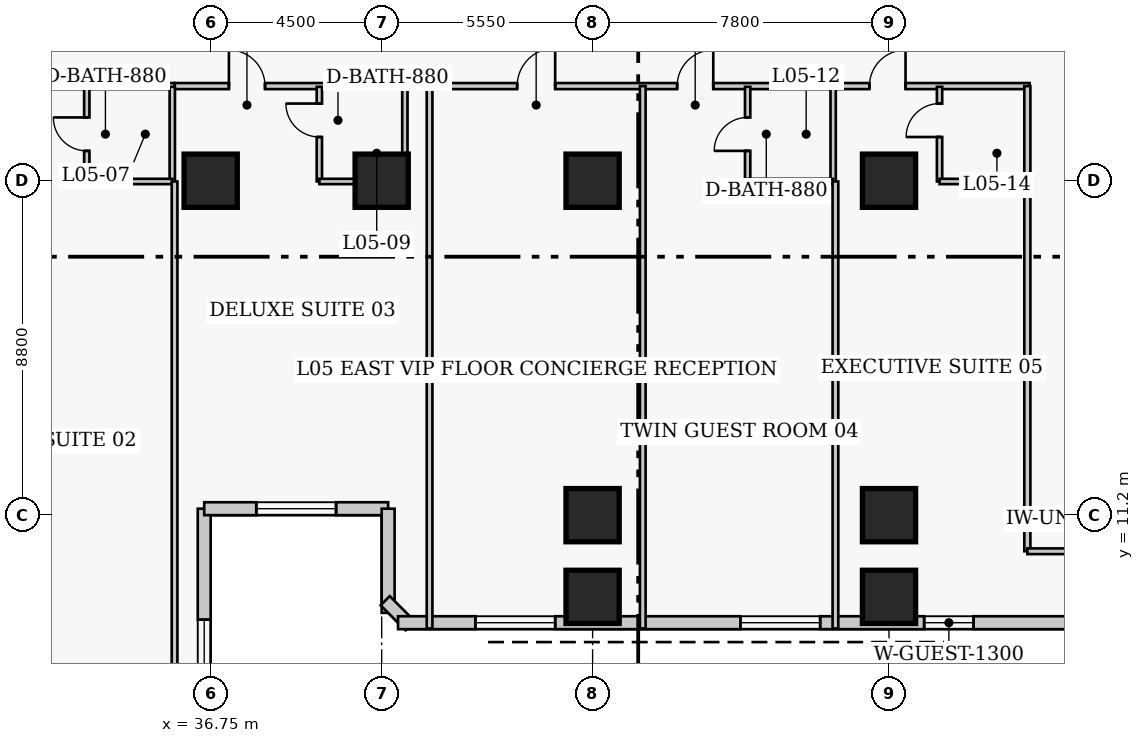
"""IFC4 building model, lengths in metres.
Left out: names, types, materials, properties, quantities, classifications, styles, units other than length and angle.
Written with IfcOpenShell. Run it as: python <this file> out.ifc"""

import sys

from ifc_helpers import new_model, si_unit, direction, frame, frame_2d, origin, origin_2d, place, context, subcontext, project, spatial, rectangle, extrude, element, fill, save


model = new_model("IFC4")
c1 = context("Model", 3, precision=1e-05, world=origin(), true_north=direction((0.0, 1.0)))
c2 = subcontext(c1, "Body", "Model", "MODEL_VIEW")
j1 = project(units=[si_unit("LENGTHUNIT", "METRE"), si_unit("PLANEANGLEUNIT", "RADIAN")], contexts=[c1])
p1 = place(None, origin())
s1 = spatial("IfcSite", under=j1, at=p1, CompositionType="ELEMENT")
p2 = place(p1, origin())
s2 = spatial("IfcBuilding", under=s1, at=p2, CompositionType="ELEMENT")
p3 = place(p2, frame((0.0, 0.0, 26.0)))
s3 = spatial("IfcBuildingStorey", under=s2, at=p3, CompositionType="ELEMENT", Elevation=26.0)
for number, where, z_axis, x_axis in (
    (1, (36.75, 20.0, 0.0), (0.0, 0.0, 1.0), (1.0, 0.0, 0.0)),
    (2, (41.25, 20.0, 0.0), (0.0, 0.0, 1.0), (1.0, 0.0, 0.0)),
    (3, (46.8, 11.2, 0.0), (0.0, 0.0, 1.0), (1.0, 0.0, 0.0)),
):
    element("IfcColumn", number, at=place(p3, frame(where, z_axis=z_axis, x_axis=x_axis)), inside=s3, PredefinedType="COLUMN", context=c2, shape_type="SweptSolid", body=[
        extrude(rectangle(XDim=1.4, YDim=1.4, at=origin_2d()), origin(), (0.0, 0.0, 1.0), 3.8),
    ])
p4 = place(p3, frame((46.8, 20.0, -0.26), z_axis=(0.0, 0.0, 1.0), x_axis=(1.0, 0.0, 0.0)))
e4 = element("IfcColumn", 4, at=p4, inside=s3, PredefinedType="COLUMN", context=c2, shape_type="SweptSolid", body=[
    extrude(rectangle(XDim=1.4, YDim=1.4, at=origin_2d()), origin(), (0.0, 0.0, 1.0), 4.06),
])
p5 = place(p3, frame((54.6, 11.2, 0.0), z_axis=(0.0, 0.0, 1.0), x_axis=(1.0, 0.0, 0.0)))
e5 = element("IfcColumn", 5, at=p5, inside=s3, PredefinedType="COLUMN", context=c2, shape_type="SweptSolid", body=[
    extrude(rectangle(XDim=1.4, YDim=1.4, at=origin_2d()), origin(), (0.0, 0.0, 1.0), 3.8),
])
p6 = place(p3, frame((54.6, 20.0, -0.26), z_axis=(0.0, 0.0, 1.0), x_axis=(1.0, 0.0, 0.0)))
e6 = element("IfcColumn", 6, at=p6, inside=s3, PredefinedType="COLUMN", context=c2, shape_type="SweptSolid", body=[
    extrude(rectangle(XDim=1.4, YDim=1.4, at=origin_2d()), origin(), (0.0, 0.0, 1.0), 4.06),
])
for number, where, z_axis, x_axis in (
    (7, (46.8, 9.05, 0.0), (0.0, 0.0, 1.0), (1.0, 0.0, 0.0)),
    (8, (54.6, 9.05, 0.0), (0.0, 0.0, 1.0), (1.0, 0.0, 0.0)),
):
    element("IfcColumn", number, at=place(p3, frame(where, z_axis=z_axis, x_axis=x_axis)), inside=s3, PredefinedType="COLUMN", context=c2, shape_type="SweptSolid", body=[
        extrude(rectangle(XDim=1.4, YDim=1.4, at=origin_2d()), origin(), (0.0, 0.0, 1.0), 3.8),
    ])
p7 = place(p3, frame((36.58, 3.43, 0.0), z_axis=(0.0, 0.0, 1.0), x_axis=(0.0, 1.0, 0.0)))
e9 = element("IfcWall", 9, at=p7, inside=s3, PredefinedType="SOLIDWALL", context=c2, shape_type="SweptSolid", body=[
    extrude(rectangle(XDim=7.94, YDim=0.34, at=frame_2d((3.97, 0.0))), origin(), (0.0, 0.0, 1.0), 3.54),
])
p8 = place(p7, frame((2.92, 0.0, 0.85)))
e10 = element("IfcOpeningElement", 10, at=p8, cuts=e9, PredefinedType="OPENING", context=c2, shape_type="SweptSolid", body=[
    extrude(rectangle(XDim=2.1, YDim=1.85, at=frame_2d((1.05, 0.925))), frame((0.0, 0.18, 0.0), z_axis=(0.0, -1.0, 0.0), x_axis=(1.0, 0.0, 0.0)), (0.0, 0.0, 1.0), 0.36),
])
p9 = place(p3, frame((36.58, 11.37, 0.0), z_axis=(0.0, 0.0, 1.0), x_axis=(1.0, 0.0, 0.0)))
e11 = element("IfcWall", 11, at=p9, inside=s3, PredefinedType="SOLIDWALL", context=c2, shape_type="SweptSolid", body=[
    extrude(rectangle(XDim=4.84, YDim=0.34, at=frame_2d((2.42, 0.0))), origin(), (0.0, 0.0, 1.0), 3.54),
])
p10 = place(p9, frame((1.37, 0.0, 0.85)))
e12 = element("IfcOpeningElement", 12, at=p10, cuts=e11, PredefinedType="OPENING", context=c2, shape_type="SweptSolid", body=[
    extrude(rectangle(XDim=2.1, YDim=1.85, at=frame_2d((1.05, 0.925))), frame((0.0, 0.18, 0.0), z_axis=(0.0, -1.0, 0.0), x_axis=(1.0, 0.0, 0.0)), (0.0, 0.0, 1.0), 0.36),
])
p11 = place(p3, frame((41.42, 11.37, 0.0), z_axis=(0.0, 0.0, 1.0), x_axis=(0.0, -1.0, 0.0)))
e13 = element("IfcWall", 13, at=p11, inside=s3, PredefinedType="SOLIDWALL", context=c2, shape_type="SweptSolid", body=[
    extrude(rectangle(XDim=2.74, YDim=0.34, at=frame_2d((1.37, 0.0))), origin(), (0.0, 0.0, 1.0), 3.54),
])
p12 = place(p3, frame((41.342, 8.948, 0.0), z_axis=(0.0, 0.0, 1.0), x_axis=(0.707238225886, -0.706975312048, 0.0)))
e14 = element("IfcWall", 14, at=p12, inside=s3, PredefinedType="SOLIDWALL", context=c2, shape_type="SweptSolid", body=[
    extrude(rectangle(XDim=0.929, YDim=0.34, at=frame_2d((0.464, 0.0))), origin(), (0.0, 0.0, 1.0), 3.54),
])
p13 = place(p3, frame((41.68, 8.37, 0.0), z_axis=(0.0, 0.0, 1.0), x_axis=(1.0, 0.0, 0.0)))
e15 = element("IfcWall", 15, at=p13, inside=s3, PredefinedType="SOLIDWALL", context=c2, shape_type="SweptSolid", body=[
    extrude(rectangle(XDim=29.89, YDim=0.34, at=frame_2d((14.945, 0.0))), origin(), (0.0, 0.0, 1.0), 3.54),
])
p14 = place(p13, frame((2.036, 0.0, 0.85)))
e16 = element("IfcOpeningElement", 16, at=p14, cuts=e15, PredefinedType="OPENING", context=c2, shape_type="SweptSolid", body=[
    extrude(rectangle(XDim=2.1, YDim=1.85, at=frame_2d((1.05, 0.925))), frame((0.0, 0.18, 0.0), z_axis=(0.0, -1.0, 0.0), x_axis=(1.0, 0.0, 0.0)), (0.0, 0.0, 1.0), 0.36),
])
p15 = place(p13, frame((9.009, 0.0, 0.85)))
e17 = element("IfcOpeningElement", 17, at=p15, cuts=e15, PredefinedType="OPENING", context=c2, shape_type="SweptSolid", body=[
    extrude(rectangle(XDim=2.1, YDim=1.85, at=frame_2d((1.05, 0.925))), frame((0.0, 0.18, 0.0), z_axis=(0.0, -1.0, 0.0), x_axis=(1.0, 0.0, 0.0)), (0.0, 0.0, 1.0), 0.36),
])
p16 = place(p13, frame((26.254, 0.0, 0.85)))
e18 = element("IfcOpeningElement", 18, at=p16, cuts=e15, PredefinedType="OPENING", context=c2, shape_type="SweptSolid", body=[
    extrude(rectangle(XDim=2.1, YDim=1.85, at=frame_2d((1.05, 0.925))), frame((0.0, 0.18, 0.0), z_axis=(0.0, -1.0, 0.0), x_axis=(1.0, 0.0, 0.0)), (0.0, 0.0, 1.0), 0.36),
])
p17 = place(p13, frame((13.845, 0.0, 0.85)))
e19 = element("IfcOpeningElement", 19, at=p17, cuts=e15, PredefinedType="OPENING", context=c2, shape_type="SweptSolid", body=[
    extrude(rectangle(XDim=1.3, YDim=1.7, at=frame_2d((0.65, 0.85))), frame((0.0, 0.18, 0.0), z_axis=(0.0, -1.0, 0.0), x_axis=(1.0, 0.0, 0.0)), (0.0, 0.0, 1.0), 0.36),
])
p18 = place(p3, frame((18.8, 22.49, 0.0), z_axis=(0.0, 0.0, 1.0), x_axis=(1.0, 0.0, 0.0)))
e20 = element("IfcWall", 20, at=p18, inside=s3, PredefinedType="PARTITIONING", context=c2, shape_type="SweptSolid", body=[
    extrude(rectangle(XDim=17.0, YDim=0.16, at=frame_2d((8.5, 0.0))), origin(), (0.0, 0.0, 1.0), 3.54),
])
p19 = place(p18, frame((2.085, 0.0, 0.0)))
e21 = element("IfcOpeningElement", 21, at=p19, cuts=e20, PredefinedType="OPENING", context=c2, shape_type="SweptSolid", body=[
    extrude(rectangle(XDim=1.0, YDim=2.15, at=frame_2d((0.5, 1.075))), frame((0.0, 0.09, 0.0), z_axis=(0.0, -1.0, 0.0), x_axis=(1.0, 0.0, 0.0)), (0.0, 0.0, 1.0), 0.18),
])
p20 = place(p18, frame((6.052, 0.0, 0.0)))
e22 = element("IfcOpeningElement", 22, at=p20, cuts=e20, PredefinedType="OPENING", context=c2, shape_type="SweptSolid", body=[
    extrude(rectangle(XDim=0.95, YDim=2.1, at=frame_2d((0.475, 1.05))), frame((0.0, 0.09, 0.0), z_axis=(0.0, -1.0, 0.0), x_axis=(1.0, 0.0, 0.0)), (0.0, 0.0, 1.0), 0.18),
])
p21 = place(p18, frame((11.997, 0.0, 0.0)))
e23 = element("IfcOpeningElement", 23, at=p21, cuts=e20, PredefinedType="OPENING", context=c2, shape_type="SweptSolid", body=[
    extrude(rectangle(XDim=0.95, YDim=2.1, at=frame_2d((0.475, 1.05))), frame((0.0, 0.09, 0.0), z_axis=(0.0, -1.0, 0.0), x_axis=(1.0, 0.0, 0.0)), (0.0, 0.0, 1.0), 0.18),
])
p22 = place(p3, frame((35.8, 22.49, 0.0), z_axis=(0.0, 0.0, 1.0), x_axis=(1.0, 0.0, 0.0)))
e24 = element("IfcWall", 24, at=p22, inside=s3, PredefinedType="PARTITIONING", context=c2, shape_type="SweptSolid", body=[
    extrude(rectangle(XDim=22.5, YDim=0.16, at=frame_2d((11.25, 0.0))), origin(), (0.0, 0.0, 1.0), 3.54),
])
p23 = place(p22, frame((1.43, 0.0, 0.0)))
e25 = element("IfcOpeningElement", 25, at=p23, cuts=e24, PredefinedType="OPENING", context=c2, shape_type="SweptSolid", body=[
    extrude(rectangle(XDim=0.95, YDim=2.1, at=frame_2d((0.475, 1.05))), frame((0.0, 0.09, 0.0), z_axis=(0.0, -1.0, 0.0), x_axis=(1.0, 0.0, 0.0)), (0.0, 0.0, 1.0), 0.18),
])
p24 = place(p22, frame((9.015, 0.0, 0.0)))
e26 = element("IfcOpeningElement", 26, at=p24, cuts=e24, PredefinedType="OPENING", context=c2, shape_type="SweptSolid", body=[
    extrude(rectangle(XDim=1.0, YDim=2.15, at=frame_2d((0.5, 1.075))), frame((0.0, 0.09, 0.0), z_axis=(0.0, -1.0, 0.0), x_axis=(1.0, 0.0, 0.0)), (0.0, 0.0, 1.0), 0.18),
])
p25 = place(p22, frame((13.225, 0.0, 0.0)))
e27 = element("IfcOpeningElement", 27, at=p25, cuts=e24, PredefinedType="OPENING", context=c2, shape_type="SweptSolid", body=[
    extrude(rectangle(XDim=0.95, YDim=2.1, at=frame_2d((0.475, 1.05))), frame((0.0, 0.09, 0.0), z_axis=(0.0, -1.0, 0.0), x_axis=(1.0, 0.0, 0.0)), (0.0, 0.0, 1.0), 0.18),
])
p26 = place(p22, frame((18.285, 0.0, 0.0)))
e28 = element("IfcOpeningElement", 28, at=p26, cuts=e24, PredefinedType="OPENING", context=c2, shape_type="SweptSolid", body=[
    extrude(rectangle(XDim=0.95, YDim=2.1, at=frame_2d((0.475, 1.05))), frame((0.0, 0.09, 0.0), z_axis=(0.0, -1.0, 0.0), x_axis=(1.0, 0.0, 0.0)), (0.0, 0.0, 1.0), 0.18),
])
p27 = place(p3, frame((58.24, 10.25, 0.0), z_axis=(0.0, 0.0, 1.0), x_axis=(0.0, 1.0, 0.0)))
e29 = element("IfcWall", 29, at=p27, inside=s3, PredefinedType="PARTITIONING", context=c2, shape_type="SweptSolid", body=[
    extrude(rectangle(XDim=12.24, YDim=0.16, at=frame_2d((6.12, 0.0))), origin(), (0.0, 0.0, 1.0), 3.54),
])
p28 = place(p3, frame((58.24, 10.25, 0.0), z_axis=(0.0, 0.0, 1.0), x_axis=(1.0, 0.0, 0.0)))
e30 = element("IfcWall", 30, at=p28, inside=s3, PredefinedType="PARTITIONING", context=c2, shape_type="SweptSolid", body=[
    extrude(rectangle(XDim=2.22, YDim=0.15, at=frame_2d((1.11, 0.0))), origin(), (0.0, 0.0, 1.0), 3.54),
])
p29 = place(p3, frame((33.49, 19.98, 0.0), z_axis=(0.0, 0.0, 1.0), x_axis=(0.0, 1.0, 0.0)))
e31 = element("IfcWall", 31, at=p29, inside=s3, PredefinedType="PLUMBINGWALL", context=c2, shape_type="SweptSolid", body=[
    extrude(rectangle(XDim=2.49, YDim=0.14, at=frame_2d((1.245, 0.0))), origin(), (0.0, 0.0, 1.0), 3.54),
])
p30 = place(p29, frame((0.805, 0.0, 0.0)))
e32 = element("IfcOpeningElement", 32, at=p30, cuts=e31, PredefinedType="OPENING", context=c2, shape_type="SweptSolid", body=[
    extrude(rectangle(XDim=0.88, YDim=2.05, at=frame_2d((0.44, 1.025))), frame((0.0, 0.08, 0.0), z_axis=(0.0, -1.0, 0.0), x_axis=(1.0, 0.0, 0.0)), (0.0, 0.0, 1.0), 0.16),
])
p31 = place(p3, frame((35.74, 19.98, 0.0), z_axis=(0.0, 0.0, 1.0), x_axis=(0.0, 1.0, 0.0)))
e33 = element("IfcWall", 33, at=p31, inside=s3, PredefinedType="PLUMBINGWALL", context=c2, shape_type="SweptSolid", body=[
    extrude(rectangle(XDim=2.49, YDim=0.14, at=frame_2d((1.245, 0.0))), origin(), (0.0, 0.0, 1.0), 3.54),
])
p32 = place(p3, frame((33.49, 19.98, 0.0), z_axis=(0.0, 0.0, 1.0), x_axis=(1.0, 0.0, 0.0)))
e34 = element("IfcWall", 34, at=p32, inside=s3, PredefinedType="PLUMBINGWALL", context=c2, shape_type="SweptSolid", body=[
    extrude(rectangle(XDim=2.25, YDim=0.14, at=frame_2d((1.125, 0.0))), origin(), (0.0, 0.0, 1.0), 2.593),
])
p33 = place(p3, frame((35.8, 3.02, 0.0), z_axis=(0.0, 0.0, 1.0), x_axis=(0.0, 1.0, 0.0)))
e35 = element("IfcWall", 35, at=p33, inside=s3, PredefinedType="PARTITIONING", context=c2, shape_type="SweptSolid", body=[
    extrude(rectangle(XDim=16.96, YDim=0.15, at=frame_2d((8.48, 0.0))), origin(), (0.0, 0.0, 1.0), 3.54),
])
p34 = place(p3, frame((39.61, 19.98, 0.0), z_axis=(0.0, 0.0, 1.0), x_axis=(0.0, 1.0, 0.0)))
e36 = element("IfcWall", 36, at=p34, inside=s3, PredefinedType="PLUMBINGWALL", context=c2, shape_type="SweptSolid", body=[
    extrude(rectangle(XDim=2.49, YDim=0.14, at=frame_2d((1.245, 0.0))), origin(), (0.0, 0.0, 1.0), 3.54),
])
p35 = place(p34, frame((1.17, 0.0, 0.0)))
e37 = element("IfcOpeningElement", 37, at=p35, cuts=e36, PredefinedType="OPENING", context=c2, shape_type="SweptSolid", body=[
    extrude(rectangle(XDim=0.88, YDim=2.05, at=frame_2d((0.44, 1.025))), frame((0.0, 0.08, 0.0), z_axis=(0.0, -1.0, 0.0), x_axis=(1.0, 0.0, 0.0)), (0.0, 0.0, 1.0), 0.16),
])
p36 = place(p3, frame((41.86, 19.98, 0.0), z_axis=(0.0, 0.0, 1.0), x_axis=(0.0, 1.0, 0.0)))
e38 = element("IfcWall", 38, at=p36, inside=s3, PredefinedType="PLUMBINGWALL", context=c2, shape_type="SweptSolid", body=[
    extrude(rectangle(XDim=2.49, YDim=0.14, at=frame_2d((1.245, 0.0))), origin(), (0.0, 0.0, 1.0), 3.54),
])
p37 = place(p3, frame((39.61, 19.98, 0.0), z_axis=(0.0, 0.0, 1.0), x_axis=(1.0, 0.0, 0.0)))
e39 = element("IfcWall", 39, at=p37, inside=s3, PredefinedType="PLUMBINGWALL", context=c2, shape_type="SweptSolid", body=[
    extrude(rectangle(XDim=2.25, YDim=0.14, at=frame_2d((1.125, 0.0))), origin(), (0.0, 0.0, 1.0), 2.593),
])
for number, where, z_axis, x_axis in (
    (40, (42.51, 8.22, 0.0), (0.0, 0.0, 1.0), (0.0, 1.0, 0.0)),
    (41, (48.12, 8.22, 0.0), (0.0, 0.0, 1.0), (0.0, 1.0, 0.0)),
):
    element("IfcWall", number, at=place(p3, frame(where, z_axis=z_axis, x_axis=x_axis)), inside=s3, PredefinedType="PARTITIONING", context=c2, shape_type="SweptSolid", body=[
        extrude(rectangle(XDim=14.27, YDim=0.15, at=frame_2d((7.135, 0.0))), origin(), (0.0, 0.0, 1.0), 3.54),
    ])
p38 = place(p3, frame((50.88, 19.98, 0.0), z_axis=(0.0, 0.0, 1.0), x_axis=(0.0, 1.0, 0.0)))
e42 = element("IfcWall", 42, at=p38, inside=s3, PredefinedType="PLUMBINGWALL", context=c2, shape_type="SweptSolid", body=[
    extrude(rectangle(XDim=2.49, YDim=0.14, at=frame_2d((1.245, 0.0))), origin(), (0.0, 0.0, 1.0), 3.54),
])
p39 = place(p38, frame((0.805, 0.0, 0.0)))
e43 = element("IfcOpeningElement", 43, at=p39, cuts=e42, PredefinedType="OPENING", context=c2, shape_type="SweptSolid", body=[
    extrude(rectangle(XDim=0.88, YDim=2.05, at=frame_2d((0.44, 1.025))), frame((0.0, 0.08, 0.0), z_axis=(0.0, -1.0, 0.0), x_axis=(1.0, 0.0, 0.0)), (0.0, 0.0, 1.0), 0.16),
])
p40 = place(p3, frame((53.13, 19.98, 0.0), z_axis=(0.0, 0.0, 1.0), x_axis=(0.0, 1.0, 0.0)))
e44 = element("IfcWall", 44, at=p40, inside=s3, PredefinedType="PLUMBINGWALL", context=c2, shape_type="SweptSolid", body=[
    extrude(rectangle(XDim=2.49, YDim=0.14, at=frame_2d((1.245, 0.0))), origin(), (0.0, 0.0, 1.0), 3.54),
])
p41 = place(p3, frame((50.88, 19.98, 0.0), z_axis=(0.0, 0.0, 1.0), x_axis=(1.0, 0.0, 0.0)))
e45 = element("IfcWall", 45, at=p41, inside=s3, PredefinedType="PLUMBINGWALL", context=c2, shape_type="SweptSolid", body=[
    extrude(rectangle(XDim=2.25, YDim=0.14, at=frame_2d((1.125, 0.0))), origin(), (0.0, 0.0, 1.0), 2.593),
])
p42 = place(p3, frame((53.19, 8.22, 0.0), z_axis=(0.0, 0.0, 1.0), x_axis=(0.0, 1.0, 0.0)))
e46 = element("IfcWall", 46, at=p42, inside=s3, PredefinedType="PARTITIONING", context=c2, shape_type="SweptSolid", body=[
    extrude(rectangle(XDim=11.76, YDim=0.15, at=frame_2d((5.88, 0.0))), origin(), (0.0, 0.0, 1.0), 3.54),
])
p43 = place(p3, frame((55.93, 19.98, 0.0), z_axis=(0.0, 0.0, 1.0), x_axis=(0.0, 1.0, 0.0)))
e47 = element("IfcWall", 47, at=p43, inside=s3, PredefinedType="PLUMBINGWALL", context=c2, shape_type="SweptSolid", body=[
    extrude(rectangle(XDim=2.49, YDim=0.14, at=frame_2d((1.245, 0.0))), origin(), (0.0, 0.0, 1.0), 3.54),
])
p44 = place(p43, frame((1.17, 0.0, 0.0)))
e48 = element("IfcOpeningElement", 48, at=p44, cuts=e47, PredefinedType="OPENING", context=c2, shape_type="SweptSolid", body=[
    extrude(rectangle(XDim=0.88, YDim=2.05, at=frame_2d((0.44, 1.025))), frame((0.0, 0.08, 0.0), z_axis=(0.0, -1.0, 0.0), x_axis=(1.0, 0.0, 0.0)), (0.0, 0.0, 1.0), 0.16),
])
p45 = place(p3, frame((55.93, 19.98, 0.0), z_axis=(0.0, 0.0, 1.0), x_axis=(1.0, 0.0, 0.0)))
e49 = element("IfcWall", 49, at=p45, inside=s3, PredefinedType="PLUMBINGWALL", context=c2, shape_type="SweptSolid", body=[
    extrude(rectangle(XDim=2.25, YDim=0.14, at=frame_2d((1.125, 0.0))), origin(), (0.0, 0.0, 1.0), 2.593),
])
p46 = place(p8, origin())
e50 = element("IfcWindow", 50, at=p46, inside=s3, PartitioningType="SINGLE_PANEL", PredefinedType="WINDOW", context=c2, shape_type="SweptSolid", body=[
    extrude(rectangle(XDim=2.1, YDim=1.85, at=frame_2d((1.05, 0.925))), frame((0.0, 0.03, 0.0), z_axis=(0.0, -1.0, 0.0), x_axis=(1.0, 0.0, 0.0)), (0.0, 0.0, 1.0), 0.06),
])
fill(e10, e50)
p47 = place(p10, origin())
e51 = element("IfcWindow", 51, at=p47, inside=s3, PartitioningType="SINGLE_PANEL", PredefinedType="WINDOW", context=c2, shape_type="SweptSolid", body=[
    extrude(rectangle(XDim=2.1, YDim=1.85, at=frame_2d((1.05, 0.925))), frame((0.0, 0.03, 0.0), z_axis=(0.0, -1.0, 0.0), x_axis=(1.0, 0.0, 0.0)), (0.0, 0.0, 1.0), 0.06),
])
fill(e12, e51)
p48 = place(p14, origin())
e52 = element("IfcWindow", 52, at=p48, inside=s3, PartitioningType="SINGLE_PANEL", PredefinedType="WINDOW", context=c2, shape_type="SweptSolid", body=[
    extrude(rectangle(XDim=2.1, YDim=1.85, at=frame_2d((1.05, 0.925))), frame((0.0, 0.03, 0.0), z_axis=(0.0, -1.0, 0.0), x_axis=(1.0, 0.0, 0.0)), (0.0, 0.0, 1.0), 0.06),
])
fill(e16, e52)
p49 = place(p15, origin())
e53 = element("IfcWindow", 53, at=p49, inside=s3, PartitioningType="SINGLE_PANEL", PredefinedType="WINDOW", context=c2, shape_type="SweptSolid", body=[
    extrude(rectangle(XDim=2.1, YDim=1.85, at=frame_2d((1.05, 0.925))), frame((0.0, 0.03, 0.0), z_axis=(0.0, -1.0, 0.0), x_axis=(1.0, 0.0, 0.0)), (0.0, 0.0, 1.0), 0.06),
])
fill(e17, e53)
p50 = place(p17, origin())
e54 = element("IfcWindow", 54, at=p50, inside=s3, PartitioningType="SINGLE_PANEL", PredefinedType="WINDOW", context=c2, shape_type="SweptSolid", body=[
    extrude(rectangle(XDim=1.3, YDim=1.7, at=frame_2d((0.65, 0.85))), frame((0.0, 0.03, 0.0), z_axis=(0.0, -1.0, 0.0), x_axis=(1.0, 0.0, 0.0)), (0.0, 0.0, 1.0), 0.06),
])
fill(e19, e54)
p51 = place(p30, origin())
e55 = element("IfcDoor", 55, at=p51, inside=s3, OperationType="SINGLE_SWING_RIGHT", PredefinedType="DOOR", context=c2, shape_type="SweptSolid", body=[
    extrude(rectangle(XDim=0.88, YDim=2.05, at=frame_2d((0.44, 1.025))), frame((0.0, 0.025, 0.0), z_axis=(0.0, -1.0, 0.0), x_axis=(1.0, 0.0, 0.0)), (0.0, 0.0, 1.0), 0.05),
])
fill(e32, e55)
p52 = place(p35, origin())
e56 = element("IfcDoor", 56, at=p52, inside=s3, OperationType="SINGLE_SWING_RIGHT", PredefinedType="DOOR", context=c2, shape_type="SweptSolid", body=[
    extrude(rectangle(XDim=0.88, YDim=2.05, at=frame_2d((0.44, 1.025))), frame((0.0, 0.025, 0.0), z_axis=(0.0, -1.0, 0.0), x_axis=(1.0, 0.0, 0.0)), (0.0, 0.0, 1.0), 0.05),
])
fill(e37, e56)
p53 = place(p23, origin())
e57 = element("IfcDoor", 57, at=p53, inside=s3, OperationType="SINGLE_SWING_LEFT", PredefinedType="DOOR", context=c2, shape_type="SweptSolid", body=[
    extrude(rectangle(XDim=0.95, YDim=2.1, at=frame_2d((0.475, 1.05))), frame((0.0, 0.025, 0.0), z_axis=(0.0, -1.0, 0.0), x_axis=(1.0, 0.0, 0.0)), (0.0, 0.0, 1.0), 0.05),
])
fill(e25, e57)
p54 = place(p24, origin())
e58 = element("IfcDoor", 58, at=p54, inside=s3, OperationType="SINGLE_SWING_RIGHT", PredefinedType="DOOR", context=c2, shape_type="SweptSolid", body=[
    extrude(rectangle(XDim=1.0, YDim=2.15, at=frame_2d((0.5, 1.075))), frame((0.0, 0.025, 0.0), z_axis=(0.0, -1.0, 0.0), x_axis=(1.0, 0.0, 0.0)), (0.0, 0.0, 1.0), 0.05),
])
fill(e26, e58)
p55 = place(p39, origin())
e59 = element("IfcDoor", 59, at=p55, inside=s3, OperationType="SINGLE_SWING_LEFT", PredefinedType="DOOR", context=c2, shape_type="SweptSolid", body=[
    extrude(rectangle(XDim=0.88, YDim=2.05, at=frame_2d((0.44, 1.025))), frame((0.0, 0.025, 0.0), z_axis=(0.0, -1.0, 0.0), x_axis=(1.0, 0.0, 0.0)), (0.0, 0.0, 1.0), 0.05),
])
fill(e43, e59)
p56 = place(p25, origin())
e60 = element("IfcDoor", 60, at=p56, inside=s3, OperationType="SINGLE_SWING_RIGHT", PredefinedType="DOOR", context=c2, shape_type="SweptSolid", body=[
    extrude(rectangle(XDim=0.95, YDim=2.1, at=frame_2d((0.475, 1.05))), frame((0.0, 0.025, 0.0), z_axis=(0.0, -1.0, 0.0), x_axis=(1.0, 0.0, 0.0)), (0.0, 0.0, 1.0), 0.05),
])
fill(e27, e60)
p57 = place(p44, origin())
e61 = element("IfcDoor", 61, at=p57, inside=s3, OperationType="SINGLE_SWING_LEFT", PredefinedType="DOOR", context=c2, shape_type="SweptSolid", body=[
    extrude(rectangle(XDim=0.88, YDim=2.05, at=frame_2d((0.44, 1.025))), frame((0.0, 0.025, 0.0), z_axis=(0.0, -1.0, 0.0), x_axis=(1.0, 0.0, 0.0)), (0.0, 0.0, 1.0), 0.05),
])
fill(e48, e61)
p58 = place(p26, origin())
e62 = element("IfcDoor", 62, at=p58, inside=s3, OperationType="SINGLE_SWING_RIGHT", PredefinedType="DOOR", context=c2, shape_type="SweptSolid", body=[
    extrude(rectangle(XDim=0.95, YDim=2.1, at=frame_2d((0.475, 1.05))), frame((0.0, 0.025, 0.0), z_axis=(0.0, -1.0, 0.0), x_axis=(1.0, 0.0, 0.0)), (0.0, 0.0, 1.0), 0.05),
])
fill(e28, e62)
save(model, sys.argv[1])
